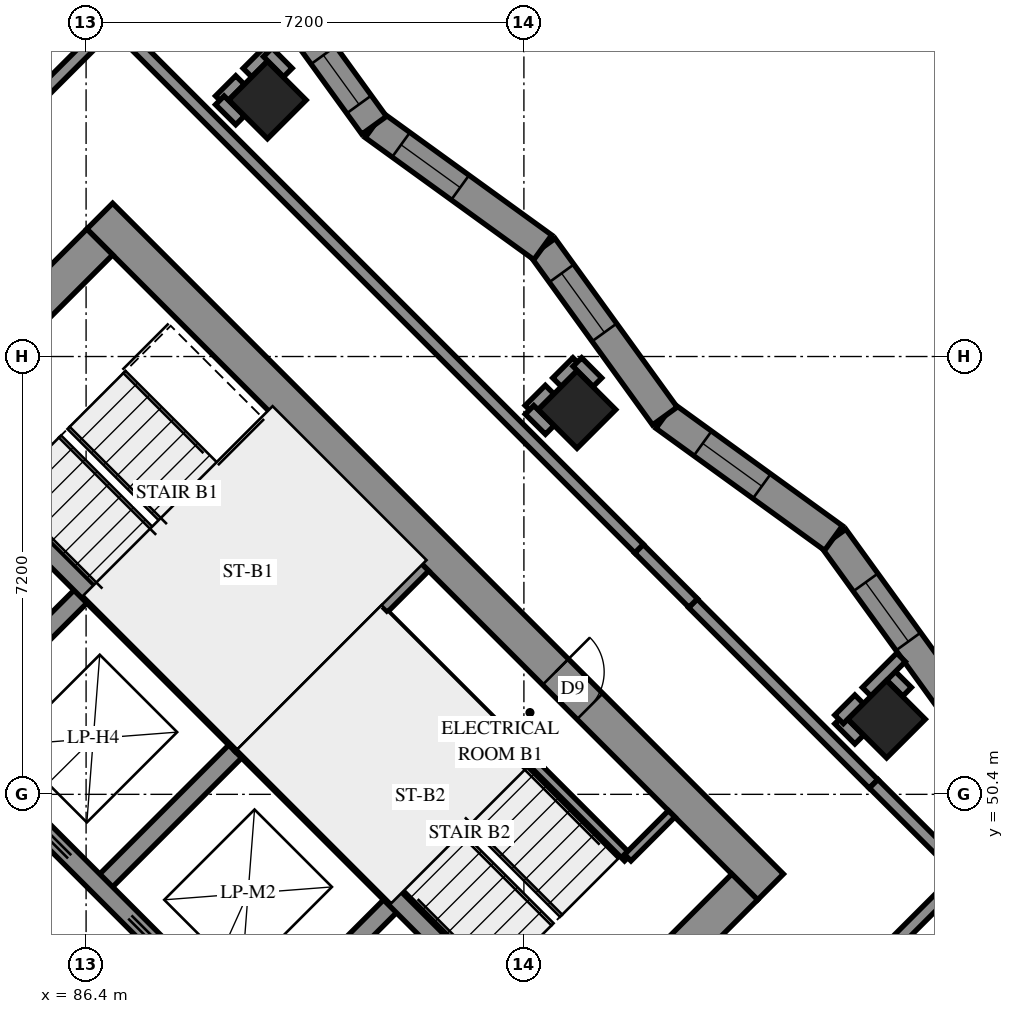
"""IFC4 building model, lengths in metres.
Left out: names, types, materials, properties, quantities, classifications, styles, units other than length and angle.
Written with IfcOpenShell. Run it as: python <this file> out.ifc"""

import sys

from ifc_helpers import new_model, si_unit, direction, frame, frame_2d, origin, origin_2d, place, context, subcontext, project, spatial, polyline, rectangle, outline, extrude, element, fill, save


model = new_model("IFC4")
c1 = context("Model", 3, precision=1e-05, world=origin(), true_north=direction((0.0, 1.0)))
c2 = subcontext(c1, "Body", "Model", "MODEL_VIEW")
j1 = project(units=[si_unit("LENGTHUNIT", "METRE"), si_unit("PLANEANGLEUNIT", "RADIAN")], contexts=[c1])
p1 = place(None, origin())
s1 = spatial("IfcSite", under=j1, at=p1, CompositionType="ELEMENT")
p2 = place(p1, origin())
s2 = spatial("IfcBuilding", under=s1, at=p2, CompositionType="ELEMENT")
p3 = place(p2, frame((0.0, 0.0, 162.6)))
s3 = spatial("IfcBuildingStorey", under=s2, at=p3, CompositionType="ELEMENT", Elevation=162.6)
for number, where, z_axis, x_axis in (
    (1, (89.382, 61.818, 0.0), (0.0, 0.0, 1.0), (0.707, -0.707, 0.0)),
    (2, (94.474, 56.727, 0.0), (0.0, 0.0, 1.0), (0.707, -0.707, 0.0)),
    (3, (99.565, 51.635, 0.0), (0.0, 0.0, 1.0), (0.707, -0.707, 0.0)),
):
    element("IfcColumn", number, at=place(p3, frame(where, z_axis=z_axis, x_axis=x_axis)), inside=s3, PredefinedType="COLUMN", context=c2, shape_type="SweptSolid", body=[
        extrude(rectangle(XDim=0.9, YDim=0.9, at=origin_2d()), origin(), (0.0, 0.0, 1.0), 3.1),
    ])
p4 = place(p3, frame((76.018, 49.302, -0.3), z_axis=(0.0, 0.0, 1.0), x_axis=(0.7071067812, -0.7071067812, 0.0)))
e4 = element("IfcWall", 4, at=p4, inside=s3, PredefinedType="SHEAR", context=c2, shape_type="SweptSolid", body=[
    extrude(rectangle(XDim=15.6, YDim=0.6, at=frame_2d((7.8, 0.0))), origin(), (0.0, 0.0, 1.0), 2.7),
])
p5 = place(p3, frame((86.625, 59.908, -0.3), z_axis=(0.0, 0.0, 1.0), x_axis=(0.7071067812, -0.7071067812, 0.0)))
e5 = element("IfcWall", 5, at=p5, inside=s3, PredefinedType="SHEAR", context=c2, shape_type="SweptSolid", body=[
    extrude(rectangle(XDim=15.6, YDim=0.6, at=frame_2d((7.8, 0.0))), origin(), (0.0, 0.0, 1.0), 2.7),
])
p6 = place(p5, frame((10.6, 0.0, 0.3)))
e6 = element("IfcOpeningElement", 6, at=p6, cuts=e5, PredefinedType="OPENING", context=c2, shape_type="SweptSolid", body=[
    extrude(rectangle(XDim=0.8, YDim=2.1, at=frame_2d((0.4, 1.05))), frame((0.0, 0.31, 0.0), z_axis=(0.0, -1.0, 0.0), x_axis=(1.0, 0.0, 0.0)), (0.0, 0.0, 1.0), 0.62),
])
p7 = place(p3, frame((76.442, 49.302, -0.3), z_axis=(0.0, 0.0, 1.0), x_axis=(0.7071067812, 0.7071067812, 0.0)))
e7 = element("IfcWall", 7, at=p7, inside=s3, PredefinedType="SHEAR", context=c2, shape_type="SweptSolid", body=[
    extrude(rectangle(XDim=14.4, YDim=0.6, at=frame_2d((7.2, 0.0))), origin(), (0.0, 0.0, 1.0), 2.7),
])
p8 = place(p7, frame((4.55, 0.0, 0.3)))
e8 = element("IfcOpeningElement", 8, at=p8, cuts=e7, PredefinedType="OPENING", context=c2, shape_type="SweptSolid", body=[
    extrude(rectangle(XDim=1.1, YDim=2.1, at=frame_2d((0.55, 1.05))), frame((0.0, 0.31, 0.0), z_axis=(0.0, -1.0, 0.0), x_axis=(1.0, 0.0, 0.0)), (0.0, 0.0, 1.0), 0.62),
])
p9 = place(p7, frame((11.35, 0.0, 0.3)))
e9 = element("IfcOpeningElement", 9, at=p9, cuts=e7, PredefinedType="OPENING", context=c2, shape_type="SweptSolid", body=[
    extrude(rectangle(XDim=1.1, YDim=2.1, at=frame_2d((0.55, 1.05))), frame((0.0, 0.31, 0.0), z_axis=(0.0, -1.0, 0.0), x_axis=(1.0, 0.0, 0.0)), (0.0, 0.0, 1.0), 0.62),
])
p10 = place(p3, frame((87.049, 38.695, -0.3), z_axis=(0.0, 0.0, 1.0), x_axis=(0.7071067812, 0.7071067812, 0.0)))
e10 = element("IfcWall", 10, at=p10, inside=s3, PredefinedType="SHEAR", context=c2, shape_type="SweptSolid", body=[
    extrude(rectangle(XDim=14.4, YDim=0.6, at=frame_2d((7.2, 0.0))), origin(), (0.0, 0.0, 1.0), 2.7),
])
p11 = place(p10, frame((4.55, 0.0, 0.3)))
e11 = element("IfcOpeningElement", 11, at=p11, cuts=e10, PredefinedType="OPENING", context=c2, shape_type="SweptSolid", body=[
    extrude(rectangle(XDim=1.1, YDim=2.1, at=frame_2d((0.55, 1.05))), frame((0.0, 0.31, 0.0), z_axis=(0.0, -1.0, 0.0), x_axis=(1.0, 0.0, 0.0)), (0.0, 0.0, 1.0), 0.62),
])
p12 = place(p10, frame((11.35, 0.0, 0.3)))
e12 = element("IfcOpeningElement", 12, at=p12, cuts=e10, PredefinedType="OPENING", context=c2, shape_type="SweptSolid", body=[
    extrude(rectangle(XDim=1.1, YDim=2.1, at=frame_2d((0.55, 1.05))), frame((0.0, 0.31, 0.0), z_axis=(0.0, -1.0, 0.0), x_axis=(1.0, 0.0, 0.0)), (0.0, 0.0, 1.0), 0.62),
])
p13 = place(p3, frame((84.079, 51.423, 0.0), z_axis=(0.0, 0.0, 1.0), x_axis=(0.7071219326, 0.7070916295, 0.0)))
e13 = element("IfcWall", 13, at=p13, inside=s3, PredefinedType="SOLIDWALL", context=c2, shape_type="SweptSolid", body=[
    extrude(rectangle(XDim=3.3, YDim=0.3, at=frame_2d((1.65, 0.0))), origin(), (0.0, 0.0, 1.0), 3.1),
])
for number, where, z_axis, x_axis in (
    (14, (86.625, 48.878, 0.0), (0.0, 0.0, 1.0), (0.707, 0.707, 0.0)),
    (15, (89.17, 46.332, 0.0), (0.0, 0.0, 1.0), (0.707, 0.707, 0.0)),
):
    element("IfcWall", number, at=place(p3, frame(where, z_axis=z_axis, x_axis=x_axis)), inside=s3, PredefinedType="SOLIDWALL", context=c2, shape_type="SweptSolid", body=[
        extrude(rectangle(XDim=3.3, YDim=0.3, at=frame_2d((1.65, 0.0))), origin(), (0.0, 0.0, 1.0), 3.1),
    ])
p14 = place(p3, frame((78.988, 51.423, 0.0), z_axis=(0.0, 0.0, 1.0), x_axis=(0.7071067812, -0.7071067812, 0.0)))
e16 = element("IfcWall", 16, at=p14, inside=s3, PredefinedType="SOLIDWALL", context=c2, shape_type="SweptSolid", body=[
    extrude(rectangle(XDim=14.4, YDim=0.3, at=frame_2d((7.2, 0.0))), origin(), (0.0, 0.0, 1.0), 3.1),
])
p15 = place(p14, frame((1.35, 0.0, 0.0)))
e17 = element("IfcOpeningElement", 17, at=p15, cuts=e16, PredefinedType="OPENING", context=c2, shape_type="SweptSolid", body=[
    extrude(rectangle(XDim=0.9, YDim=2.1, at=frame_2d((0.45, 1.05))), frame((0.0, 0.16, 0.0), z_axis=(0.0, -1.0, 0.0), x_axis=(1.0, 0.0, 0.0)), (0.0, 0.0, 1.0), 0.32),
])
p16 = place(p14, frame((4.95, 0.0, 0.0)))
e18 = element("IfcOpeningElement", 18, at=p16, cuts=e16, PredefinedType="OPENING", context=c2, shape_type="SweptSolid", body=[
    extrude(rectangle(XDim=0.9, YDim=2.1, at=frame_2d((0.45, 1.05))), frame((0.0, 0.16, 0.0), z_axis=(0.0, -1.0, 0.0), x_axis=(1.0, 0.0, 0.0)), (0.0, 0.0, 1.0), 0.32),
])
p17 = place(p14, frame((8.55, 0.0, 0.0)))
e19 = element("IfcOpeningElement", 19, at=p17, cuts=e16, PredefinedType="OPENING", context=c2, shape_type="SweptSolid", body=[
    extrude(rectangle(XDim=0.9, YDim=2.1, at=frame_2d((0.45, 1.05))), frame((0.0, 0.16, 0.0), z_axis=(0.0, -1.0, 0.0), x_axis=(1.0, 0.0, 0.0)), (0.0, 0.0, 1.0), 0.32),
])
p18 = place(p14, frame((12.05, 0.0, 0.0)))
e20 = element("IfcOpeningElement", 20, at=p18, cuts=e16, PredefinedType="OPENING", context=c2, shape_type="SweptSolid", body=[
    extrude(rectangle(XDim=1.1, YDim=2.1, at=frame_2d((0.55, 1.05))), frame((0.0, 0.16, 0.0), z_axis=(0.0, -1.0, 0.0), x_axis=(1.0, 0.0, 0.0)), (0.0, 0.0, 1.0), 0.32),
])
p19 = place(p3, frame((81.534, 53.969, 0.0), z_axis=(0.0, 0.0, 1.0), x_axis=(0.707103309, -0.7071102534, 0.0)))
e21 = element("IfcWall", 21, at=p19, inside=s3, PredefinedType="SOLIDWALL", context=c2, shape_type="SweptSolid", body=[
    extrude(rectangle(XDim=14.4, YDim=0.3, at=frame_2d((7.2, 0.0))), origin(), (0.0, 0.0, 1.0), 3.1),
])
p20 = place(p19, frame((1.25, 0.0, 0.0)))
e22 = element("IfcOpeningElement", 22, at=p20, cuts=e21, PredefinedType="OPENING", context=c2, shape_type="SweptSolid", body=[
    extrude(rectangle(XDim=1.1, YDim=2.1, at=frame_2d((0.55, 1.05))), frame((0.0, 0.16, 0.0), z_axis=(0.0, -1.0, 0.0), x_axis=(1.0, 0.0, 0.0)), (0.0, 0.0, 1.0), 0.32),
])
p21 = place(p19, frame((4.85, 0.0, 0.0)))
e23 = element("IfcOpeningElement", 23, at=p21, cuts=e21, PredefinedType="OPENING", context=c2, shape_type="SweptSolid", body=[
    extrude(rectangle(XDim=1.1, YDim=2.1, at=frame_2d((0.55, 1.05))), frame((0.0, 0.16, 0.0), z_axis=(0.0, -1.0, 0.0), x_axis=(1.0, 0.0, 0.0)), (0.0, 0.0, 1.0), 0.32),
])
p22 = place(p19, frame((8.45, 0.0, 0.0)))
e24 = element("IfcOpeningElement", 24, at=p22, cuts=e21, PredefinedType="OPENING", context=c2, shape_type="SweptSolid", body=[
    extrude(rectangle(XDim=1.1, YDim=2.1, at=frame_2d((0.55, 1.05))), frame((0.0, 0.16, 0.0), z_axis=(0.0, -1.0, 0.0), x_axis=(1.0, 0.0, 0.0)), (0.0, 0.0, 1.0), 0.32),
])
p23 = place(p19, frame((12.05, 0.0, 0.0)))
e25 = element("IfcOpeningElement", 25, at=p23, cuts=e21, PredefinedType="OPENING", context=c2, shape_type="SweptSolid", body=[
    extrude(rectangle(XDim=1.1, YDim=2.1, at=frame_2d((0.55, 1.05))), frame((0.0, 0.16, 0.0), z_axis=(0.0, -1.0, 0.0), x_axis=(1.0, 0.0, 0.0)), (0.0, 0.0, 1.0), 0.32),
])
for number, where, z_axis, x_axis in (
    (26, (83.867, 56.302, 0.0), (0.0, 0.0, 1.0), (0.707, -0.707, 0.0)),
    (27, (88.958, 51.211, 0.0), (0.0, 0.0, 1.0), (0.707, -0.707, 0.0)),
):
    element("IfcWall", number, at=place(p3, frame(where, z_axis=z_axis, x_axis=x_axis)), inside=s3, PredefinedType="SOLIDWALL", context=c2, shape_type="SweptSolid", body=[
        extrude(rectangle(XDim=7.2, YDim=0.3, at=frame_2d((3.6, 0.0))), origin(), (0.0, 0.0, 1.0), 3.1),
    ])
p24 = place(p3, frame((88.958, 51.211, 0.0), z_axis=(0.0, 0.0, 1.0), x_axis=(0.7071067812, 0.7071067812, 0.0)))
e28 = element("IfcWall", 28, at=p24, inside=s3, PredefinedType="SOLIDWALL", context=c2, shape_type="SweptSolid", body=[
    extrude(rectangle(XDim=4.2, YDim=0.3, at=frame_2d((2.1, 0.0))), origin(), (0.0, 0.0, 1.0), 3.1),
])
p25 = place(p3, frame((100.699, 51.84, 0.0), z_axis=(0.0, 0.0, 1.0), x_axis=(-0.5862441964, 0.8101343976, 0.0)))
e29 = element("IfcWall", 29, at=p25, inside=s3, PredefinedType="SOLIDWALL", context=c2, shape_type="SweptSolid", body=[
    extrude(outline(polyline([(0.04, -0.25), (3.464, -0.25), (3.384, 0.25), (-0.04, 0.25), (0.04, -0.25)])), origin(), (0.0, 0.0, 1.0), 3.1),
])
p26 = place(p25, frame((1.325, 0.0, 0.45)))
e30 = element("IfcOpeningElement", 30, at=p26, cuts=e29, PredefinedType="OPENING", context=c2, shape_type="SweptSolid", body=[
    extrude(rectangle(XDim=1.2, YDim=2.5, at=frame_2d((0.6, 1.25))), frame((0.0, 0.26, 0.0), z_axis=(0.0, -1.0, 0.0), x_axis=(1.0, 0.0, 0.0)), (0.0, 0.0, 1.0), 0.52),
])
p27 = place(p3, frame((98.692, 54.614, 0.0), z_axis=(0.0, 0.0, 1.0), x_axis=(-0.8101343976, 0.5862441964, 0.0)))
e31 = element("IfcWall", 31, at=p27, inside=s3, PredefinedType="SOLIDWALL", context=c2, shape_type="SweptSolid", body=[
    extrude(outline(polyline([(-0.04, -0.25), (3.384, -0.25), (3.464, 0.25), (0.04, 0.25), (-0.04, -0.25)])), origin(), (0.0, 0.0, 1.0), 3.1),
])
p28 = place(p27, frame((1.456, 0.0, 0.45)))
e32 = element("IfcOpeningElement", 32, at=p28, cuts=e31, PredefinedType="OPENING", context=c2, shape_type="SweptSolid", body=[
    extrude(rectangle(XDim=1.2, YDim=2.5, at=frame_2d((0.6, 1.25))), frame((0.0, 0.26, 0.0), z_axis=(0.0, -1.0, 0.0), x_axis=(1.0, 0.0, 0.0)), (0.0, 0.0, 1.0), 0.52),
])
p29 = place(p3, frame((95.918, 56.621, 0.0), z_axis=(0.0, 0.0, 1.0), x_axis=(-0.586263364, 0.8101205268, 0.0)))
e33 = element("IfcWall", 33, at=p29, inside=s3, PredefinedType="SOLIDWALL", context=c2, shape_type="SweptSolid", body=[
    extrude(outline(polyline([(0.04, -0.25), (3.464, -0.25), (3.384, 0.25), (-0.04, 0.25), (0.04, -0.25)])), origin(), (0.0, 0.0, 1.0), 3.1),
])
p30 = place(p29, frame((1.697, 0.0, 0.45)))
e34 = element("IfcOpeningElement", 34, at=p30, cuts=e33, PredefinedType="OPENING", context=c2, shape_type="SweptSolid", body=[
    extrude(rectangle(XDim=1.2, YDim=2.5, at=frame_2d((0.6, 1.25))), frame((0.0, 0.26, 0.0), z_axis=(0.0, -1.0, 0.0), x_axis=(1.0, 0.0, 0.0)), (0.0, 0.0, 1.0), 0.52),
])
p31 = place(p3, frame((93.91, 59.395, 0.0), z_axis=(0.0, 0.0, 1.0), x_axis=(-0.8101104885, 0.5862772351, 0.0)))
e35 = element("IfcWall", 35, at=p31, inside=s3, PredefinedType="SOLIDWALL", context=c2, shape_type="SweptSolid", body=[
    extrude(outline(polyline([(-0.04, -0.25), (3.384, -0.25), (3.464, 0.25), (0.04, 0.25), (-0.04, -0.25)])), origin(), (0.0, 0.0, 1.0), 3.1),
])
p32 = place(p31, frame((1.678, 0.0, 0.45)))
e36 = element("IfcOpeningElement", 36, at=p32, cuts=e35, PredefinedType="OPENING", context=c2, shape_type="SweptSolid", body=[
    extrude(rectangle(XDim=1.2, YDim=2.5, at=frame_2d((0.6, 1.25))), frame((0.0, 0.26, 0.0), z_axis=(0.0, -1.0, 0.0), x_axis=(1.0, 0.0, 0.0)), (0.0, 0.0, 1.0), 0.52),
])
p33 = place(p3, frame((91.137, 61.402, 0.0), z_axis=(0.0, 0.0, 1.0), x_axis=(-0.5862772351, 0.8101104885, 0.0)))
e37 = element("IfcWall", 37, at=p33, inside=s3, PredefinedType="SOLIDWALL", context=c2, shape_type="SweptSolid", body=[
    extrude(outline(polyline([(0.04, -0.25), (3.464, -0.25), (3.384, 0.25), (-0.04, 0.25), (0.04, -0.25)])), origin(), (0.0, 0.0, 1.0), 3.1),
])
p34 = place(p33, frame((0.423, 0.0, 0.45)))
e38 = element("IfcOpeningElement", 38, at=p34, cuts=e37, PredefinedType="OPENING", context=c2, shape_type="SweptSolid", body=[
    extrude(rectangle(XDim=1.0, YDim=2.5, at=frame_2d((0.5, 1.25))), frame((0.0, 0.26, 0.0), z_axis=(0.0, -1.0, 0.0), x_axis=(1.0, 0.0, 0.0)), (0.0, 0.0, 1.0), 0.52),
])
p35 = place(p33, frame((2.236, 0.0, 0.45)))
e39 = element("IfcOpeningElement", 39, at=p35, cuts=e37, PredefinedType="OPENING", context=c2, shape_type="SweptSolid", body=[
    extrude(rectangle(XDim=0.8, YDim=2.5, at=frame_2d((0.4, 1.25))), frame((0.0, 0.26, 0.0), z_axis=(0.0, -1.0, 0.0), x_axis=(1.0, 0.0, 0.0)), (0.0, 0.0, 1.0), 0.52),
])
p36 = place(p3, frame((91.313, 53.354, 0.0), z_axis=(0.0, 0.0, 1.0), x_axis=(0.7071067812, -0.7071067812, 0.0)))
e40 = element("IfcWall", 40, at=p36, inside=s3, PredefinedType="PARTITIONING", context=c2, shape_type="SweptSolid", body=[
    extrude(rectangle(XDim=5.65, YDim=0.15, at=frame_2d((2.825, 0.0))), origin(), (0.0, 0.0, 1.0), 3.1),
])
p37 = place(p3, frame((95.308, 49.358, 0.0), z_axis=(0.0, 0.0, 1.0), x_axis=(0.70705776, 0.707155799, 0.0)))
e41 = element("IfcWall", 41, at=p37, inside=s3, PredefinedType="PARTITIONING", context=c2, shape_type="SweptSolid", body=[
    extrude(rectangle(XDim=1.02, YDim=0.15, at=frame_2d((0.51, 0.0))), origin(), (0.0, 0.0, 1.0), 3.1),
])
p38 = place(p3, frame((86.841, 63.093, 0.0), z_axis=(0.0, 0.0, 1.0), x_axis=(0.7071067812, -0.7071067812, 0.0)))
e42 = element("IfcWall", 42, at=p38, inside=s3, PredefinedType="PARTITIONING", context=c2, shape_type="SweptSolid", body=[
    extrude(rectangle(XDim=12.239, YDim=0.2, at=frame_2d((6.119, 0.0))), origin(), (0.0, 0.0, 1.0), 3.1),
])
p39 = place(p3, frame((94.401, 41.383, 0.0), z_axis=(0.0, 0.0, 1.0), x_axis=(0.7071067812, 0.7071067812, 0.0)))
e43 = element("IfcWall", 43, at=p39, inside=s3, PredefinedType="PARTITIONING", context=c2, shape_type="SweptSolid", body=[
    extrude(rectangle(XDim=12.066, YDim=0.2, at=frame_2d((6.033, 0.0))), origin(), (0.0, 0.0, 1.0), 3.1),
])
p40 = place(p3, frame((93.767, 42.021, 0.0), z_axis=(0.0, 0.0, 1.0), x_axis=(0.7071067812, 0.7071067812, 0.0)))
e44 = element("IfcWall", 44, at=p40, inside=s3, PredefinedType="PARTITIONING", context=c2, shape_type="SweptSolid", body=[
    extrude(rectangle(XDim=9.998, YDim=0.2, at=frame_2d((4.999, 0.0))), origin(), (0.0, 0.0, 1.0), 3.1),
])
p41 = place(p40, frame((0.196, 0.0, 0.0)))
e45 = element("IfcOpeningElement", 45, at=p41, cuts=e44, PredefinedType="OPENING", context=c2, shape_type="SweptSolid", body=[
    extrude(rectangle(XDim=1.0, YDim=2.1, at=frame_2d((0.5, 1.05))), frame((0.0, 0.11, 0.0), z_axis=(0.0, -1.0, 0.0), x_axis=(1.0, 0.0, 0.0)), (0.0, 0.0, 1.0), 0.22),
])
p42 = place(p3, frame((79.799, 56.055, 0.0), z_axis=(0.0, 0.0, 1.0), x_axis=(0.7071067812, 0.7071067812, 0.0)))
e46 = element("IfcWall", 46, at=p42, inside=s3, PredefinedType="PARTITIONING", context=c2, shape_type="SweptSolid", body=[
    extrude(rectangle(XDim=9.95, YDim=0.2, at=frame_2d((4.975, 0.0))), origin(), (0.0, 0.0, 1.0), 3.1),
])
p43 = place(p42, frame((1.071, 0.0, 0.0)))
e47 = element("IfcOpeningElement", 47, at=p43, cuts=e46, PredefinedType="OPENING", context=c2, shape_type="SweptSolid", body=[
    extrude(rectangle(XDim=1.0, YDim=2.1, at=frame_2d((0.5, 1.05))), frame((0.0, 0.11, 0.0), z_axis=(0.0, -1.0, 0.0), x_axis=(1.0, 0.0, 0.0)), (0.0, 0.0, 1.0), 0.22),
])
p44 = place(p3, frame((96.379, 53.541, 0.0), z_axis=(0.0, 0.0, 1.0), x_axis=(0.7071067812, -0.7071067812, 0.0)))
e48 = element("IfcWall", 48, at=p44, inside=s3, PredefinedType="PARTITIONING", context=c2, shape_type="SweptSolid", body=[
    extrude(rectangle(XDim=4.2, YDim=0.2, at=frame_2d((2.1, 0.0))), origin(), (0.0, 0.0, 1.0), 3.1),
])
p45 = place(p3, frame((99.352, 50.574, 0.0), z_axis=(0.0, 0.0, 1.0), x_axis=(0.7075827869, -0.7066304548, 0.0)))
e49 = element("IfcWall", 49, at=p45, inside=s3, PredefinedType="PARTITIONING", context=c2, shape_type="SweptSolid", body=[
    extrude(rectangle(XDim=2.1, YDim=0.2, at=frame_2d((1.05, 0.0))), origin(), (0.0, 0.0, 1.0), 3.1),
])
p46 = place(p3, frame((95.494, 54.438, 0.0), z_axis=(0.0, 0.0, 1.0), x_axis=(0.706312726, -0.7078999456, 0.0)))
e50 = element("IfcWall", 50, at=p46, inside=s3, PredefinedType="PARTITIONING", context=c2, shape_type="SweptSolid", body=[
    extrude(rectangle(XDim=1.26, YDim=0.2, at=frame_2d((0.63, 0.0))), origin(), (0.0, 0.0, 1.0), 3.1),
])
for number, where, z_axis, x_axis in (
    (51, (94.145, 57.177, 0.0), (0.0, 0.0, 1.0), (0.707, 0.707, 0.0)),
    (52, (88.6, 61.814, 0.0), (0.0, 0.0, 1.0), (0.707, 0.707, 0.0)),
    (53, (89.054, 62.268, 0.0), (0.0, 0.0, 1.0), (0.707, 0.707, 0.0)),
    (54, (93.691, 56.723, 0.0), (0.0, 0.0, 1.0), (0.707, 0.707, 0.0)),
):
    element("IfcWall", number, at=place(p3, frame(where, z_axis=z_axis, x_axis=x_axis)), inside=s3, PredefinedType="PARTITIONING", context=c2, shape_type="SweptSolid", body=[
        extrude(rectangle(XDim=0.469, YDim=0.2, at=frame_2d((0.235, 0.0))), origin(), (0.0, 0.0, 1.0), 3.1),
    ])
for number, where, z_axis, x_axis in (
    (55, (94.479, 57.509, 0.0), (0.0, 0.0, 1.0), (0.705, -0.709, 0.0)),
    (56, (88.599, 61.813, 0.0), (0.0, 0.0, 1.0), (0.709, -0.705, 0.0)),
    (57, (89.388, 62.602, 0.0), (0.0, 0.0, 1.0), (0.705, -0.709, 0.0)),
    (58, (93.692, 56.722, 0.0), (0.0, 0.0, 1.0), (0.709, -0.705, 0.0)),
    (59, (99.57, 52.418, 0.0), (0.0, 0.0, 1.0), (0.709, -0.705, 0.0)),
    (60, (98.784, 51.632, 0.0), (0.0, 0.0, 1.0), (0.705, -0.709, 0.0)),
):
    element("IfcWall", number, at=place(p3, frame(where, z_axis=z_axis, x_axis=x_axis)), inside=s3, PredefinedType="PARTITIONING", context=c2, shape_type="SweptSolid", body=[
        extrude(rectangle(XDim=0.468, YDim=0.2, at=frame_2d((0.234, 0.0))), origin(), (0.0, 0.0, 1.0), 3.1),
    ])
p47 = place(p3, frame((98.783, 51.633, 0.0), z_axis=(0.0, 0.0, 1.0), x_axis=(0.7071067812, 0.7071067812, 0.0)))
e61 = element("IfcWall", 61, at=p47, inside=s3, PredefinedType="PARTITIONING", context=c2, shape_type="SweptSolid", body=[
    extrude(rectangle(XDim=0.467, YDim=0.2, at=frame_2d((0.233, 0.0))), origin(), (0.0, 0.0, 1.0), 3.1),
])
p48 = place(p3, frame((99.237, 52.087, 0.0), z_axis=(0.0, 0.0, 1.0), x_axis=(0.7071067812, 0.7071067812, 0.0)))
e62 = element("IfcWall", 62, at=p48, inside=s3, PredefinedType="PARTITIONING", context=c2, shape_type="SweptSolid", body=[
    extrude(rectangle(XDim=0.8, YDim=0.2, at=frame_2d((0.4, 0.0))), origin(), (0.0, 0.0, 1.0), 3.1),
])
p49 = place(p26, origin())
e63 = element("IfcWindow", 63, at=p49, inside=s3, PartitioningType="SINGLE_PANEL", PredefinedType="WINDOW", context=c2, shape_type="SweptSolid", body=[
    extrude(rectangle(XDim=1.2, YDim=2.5, at=frame_2d((0.6, 1.25))), frame((0.0, 0.18, 0.0), z_axis=(0.0, -1.0, 0.0), x_axis=(1.0, 0.0, 0.0)), (0.0, 0.0, 1.0), 0.06),
])
fill(e30, e63)
p50 = place(p28, origin())
e64 = element("IfcWindow", 64, at=p50, inside=s3, PartitioningType="SINGLE_PANEL", PredefinedType="WINDOW", context=c2, shape_type="SweptSolid", body=[
    extrude(rectangle(XDim=1.2, YDim=2.5, at=frame_2d((0.6, 1.25))), frame((0.0, 0.18, 0.0), z_axis=(0.0, -1.0, 0.0), x_axis=(1.0, 0.0, 0.0)), (0.0, 0.0, 1.0), 0.06),
])
fill(e32, e64)
p51 = place(p30, origin())
e65 = element("IfcWindow", 65, at=p51, inside=s3, PartitioningType="SINGLE_PANEL", PredefinedType="WINDOW", context=c2, shape_type="SweptSolid", body=[
    extrude(rectangle(XDim=1.2, YDim=2.5, at=frame_2d((0.6, 1.25))), frame((0.0, 0.18, 0.0), z_axis=(0.0, -1.0, 0.0), x_axis=(1.0, 0.0, 0.0)), (0.0, 0.0, 1.0), 0.06),
])
fill(e34, e65)
p52 = place(p32, origin())
e66 = element("IfcWindow", 66, at=p52, inside=s3, PartitioningType="SINGLE_PANEL", PredefinedType="WINDOW", context=c2, shape_type="SweptSolid", body=[
    extrude(rectangle(XDim=1.2, YDim=2.5, at=frame_2d((0.6, 1.25))), frame((0.0, 0.18, 0.0), z_axis=(0.0, -1.0, 0.0), x_axis=(1.0, 0.0, 0.0)), (0.0, 0.0, 1.0), 0.06),
])
fill(e36, e66)
p53 = place(p6, origin())
e67 = element("IfcDoor", 67, at=p53, inside=s3, OperationType="SINGLE_SWING_RIGHT", PredefinedType="DOOR", context=c2, shape_type="SweptSolid", body=[
    extrude(rectangle(XDim=0.8, YDim=2.1, at=frame_2d((0.4, 1.05))), frame((0.0, 0.025, 0.0), z_axis=(0.0, -1.0, 0.0), x_axis=(1.0, 0.0, 0.0)), (0.0, 0.0, 1.0), 0.05),
])
fill(e6, e67)
p54 = place(p34, origin())
e68 = element("IfcWindow", 68, at=p54, inside=s3, PartitioningType="SINGLE_PANEL", PredefinedType="WINDOW", context=c2, shape_type="SweptSolid", body=[
    extrude(rectangle(XDim=1.0, YDim=2.5, at=frame_2d((0.5, 1.25))), frame((0.0, 0.18, 0.0), z_axis=(0.0, -1.0, 0.0), x_axis=(1.0, 0.0, 0.0)), (0.0, 0.0, 1.0), 0.06),
])
fill(e38, e68)
save(model, sys.argv[1])
